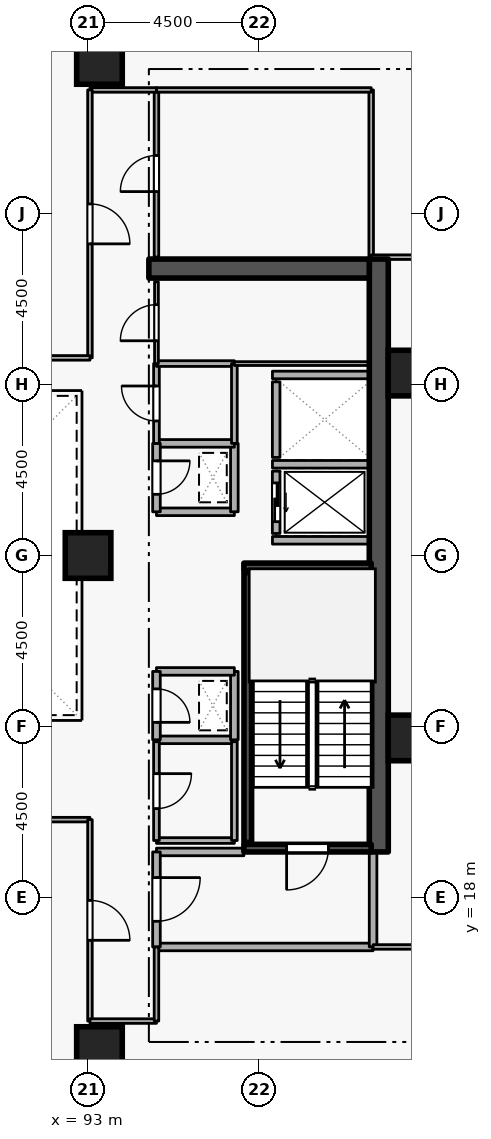
"""IFC4 building model, lengths in metres.
Left out: names, types, materials, properties, quantities, classifications, styles, units other than length and angle.
Written with IfcOpenShell. Run it as: python <this file> out.ifc"""

import sys

from ifc_helpers import new_model, si_unit, direction, frame, frame_2d, origin, origin_2d, place, context, subcontext, project, spatial, rectangle, extrude, element, fill, save


model = new_model("IFC4")
c1 = context("Model", 3, precision=1e-05, world=origin(), true_north=direction((0.0, 1.0)))
c2 = subcontext(c1, "Body", "Model", "MODEL_VIEW")
j1 = project(units=[si_unit("LENGTHUNIT", "METRE"), si_unit("PLANEANGLEUNIT", "RADIAN")], contexts=[c1])
p1 = place(None, origin())
s1 = spatial("IfcSite", under=j1, at=p1, CompositionType="ELEMENT")
p2 = place(p1, origin())
s2 = spatial("IfcBuilding", under=s1, at=p2, CompositionType="ELEMENT")
p3 = place(p2, frame((0.0, 0.0, 123.3)))
s3 = spatial("IfcBuildingStorey", under=s2, at=p3, CompositionType="ELEMENT", Elevation=123.3)
p4 = place(p3, frame((100.65, 19.2, 0.0), z_axis=(0.0, 0.0, 1.0), x_axis=(0.0, 1.0, 0.0)))
e1 = element("IfcWall", 1, at=p4, inside=s3, PredefinedType="SHEAR", context=c2, shape_type="SweptSolid", body=[
    extrude(rectangle(XDim=15.6, YDim=0.5, at=frame_2d((7.8, 0.0))), origin(), (0.0, 0.0, 1.0), 3.6),
])
p5 = place(p3, frame((94.6, 34.55, 0.0), z_axis=(0.0, 0.0, 1.0), x_axis=(1.0, 0.0, 0.0)))
e2 = element("IfcWall", 2, at=p5, inside=s3, PredefinedType="SHEAR", context=c2, shape_type="SweptSolid", body=[
    extrude(rectangle(XDim=5.8, YDim=0.5, at=frame_2d((2.9, 0.0))), origin(), (0.0, 0.0, 1.0), 3.6),
])
for number, where, z_axis, x_axis in (
    (3, (93.3, 14.0, 0.0), (0.0, 0.0, 1.0), (1.0, 0.0, 0.0)),
    (4, (93.3, 40.0, 0.0), (0.0, 0.0, 1.0), (1.0, 0.0, 0.0)),
    (5, (101.5, 22.2, 0.0), (0.0, 0.0, 1.0), (1.0, 0.0, 0.0)),
    (6, (101.5, 31.8, 0.0), (0.0, 0.0, 1.0), (1.0, 0.0, 0.0)),
    (7, (93.0, 27.0, 0.0), (0.0, 0.0, 1.0), (1.0, 0.0, 0.0)),
):
    element("IfcColumn", number, at=place(p3, frame(where, z_axis=z_axis, x_axis=x_axis)), inside=s3, PredefinedType="COLUMN", context=c2, shape_type="SweptSolid", body=[
        extrude(rectangle(XDim=1.2, YDim=1.2, at=origin_2d()), origin(), (0.0, 0.0, 1.0), 3.6),
    ])
p6 = place(p3, frame((97.95, 29.22, 0.0), z_axis=(0.0, 0.0, 1.0), x_axis=(0.0, -1.0, 0.0)))
e8 = element("IfcWall", 8, at=p6, inside=s3, PredefinedType="STANDARD", context=c2, shape_type="SweptSolid", body=[
    extrude(rectangle(XDim=1.64, YDim=0.2, at=frame_2d((0.82, 0.0))), origin(), (0.0, 0.0, 1.0), 3.34),
])
p7 = place(p6, frame((0.31, 0.0, 0.0)))
e9 = element("IfcOpeningElement", 9, at=p7, cuts=e8, PredefinedType="OPENING", context=c2, shape_type="SweptSolid", body=[
    extrude(rectangle(XDim=1.02, YDim=2.06, at=frame_2d((0.51, 1.03))), frame((0.0, 0.11, 0.0), z_axis=(0.0, -1.0, 0.0), x_axis=(1.0, 0.0, 0.0)), (0.0, 0.0, 1.0), 0.22),
])
p8 = place(p3, frame((97.95, 31.57, 0.0), z_axis=(0.0, 0.0, 1.0), x_axis=(0.0, -1.0, 0.0)))
e10 = element("IfcWall", 10, at=p8, inside=s3, PredefinedType="STANDARD", context=c2, shape_type="SweptSolid", body=[
    extrude(rectangle(XDim=1.99, YDim=0.2, at=frame_2d((0.995, 0.0))), origin(), (0.0, 0.0, 1.0), 3.34),
])
for number, where, z_axis, x_axis in (
    (11, (97.852, 29.4, 0.0), (0.0, 0.0, 1.0), (1.0, 0.0, 0.0)),
    (12, (97.852, 27.4, 0.0), (0.0, 0.0, 1.0), (1.0, 0.0, 0.0)),
    (13, (97.852, 31.75, 0.0), (0.0, 0.0, 1.0), (1.0, 0.0, 0.0)),
):
    element("IfcWall", number, at=place(p3, frame(where, z_axis=z_axis, x_axis=x_axis)), inside=s3, PredefinedType="STANDARD", context=c2, shape_type="SweptSolid", body=[
        extrude(rectangle(XDim=2.536, YDim=0.2, at=frame_2d((1.268, 0.0))), origin(), (0.0, 0.0, 1.0), 3.34),
    ])
p9 = place(p3, frame((100.45, 19.3, 0.0), z_axis=(0.0, 0.0, 1.0), x_axis=(-1.0, 0.0, 0.0)))
e14 = element("IfcWall", 14, at=p9, inside=s3, PredefinedType="SHEAR", context=c2, shape_type="SweptSolid", body=[
    extrude(rectangle(XDim=3.35, YDim=0.2, at=frame_2d((1.675, 0.0))), origin(), (0.0, 0.0, 1.0), 3.6),
])
p10 = place(p9, frame((1.125, 0.0, 0.0)))
e15 = element("IfcOpeningElement", 15, at=p10, cuts=e14, PredefinedType="OPENING", context=c2, shape_type="SweptSolid", body=[
    extrude(rectangle(XDim=1.1, YDim=2.1, at=frame_2d((0.55, 1.05))), frame((0.0, 0.11, 0.0), z_axis=(0.0, -1.0, 0.0), x_axis=(1.0, 0.0, 0.0)), (0.0, 0.0, 1.0), 0.22),
])
p11 = place(p3, frame((97.1, 26.7, 0.0), z_axis=(0.0, 0.0, 1.0), x_axis=(1.0, 0.0, 0.0)))
e16 = element("IfcWall", 16, at=p11, inside=s3, PredefinedType="SHEAR", context=c2, shape_type="SweptSolid", body=[
    extrude(rectangle(XDim=3.35, YDim=0.2, at=frame_2d((1.675, 0.0))), origin(), (0.0, 0.0, 1.0), 3.6),
])
p12 = place(p3, frame((97.203, 26.55, 0.0), z_axis=(0.0, 0.0, 1.0), x_axis=(0.0, -1.0, 0.0)))
e17 = element("IfcWall", 17, at=p12, inside=s3, PredefinedType="SHEAR", context=c2, shape_type="SweptSolid", body=[
    extrude(rectangle(XDim=7.1, YDim=0.2, at=frame_2d((3.55, 0.0))), origin(), (0.0, 0.0, 1.0), 3.6),
])
p13 = place(p3, frame((94.8, 16.7, 0.0), z_axis=(0.0, 0.0, 1.0), x_axis=(1.0, 0.0, 0.0)))
e18 = element("IfcWall", 18, at=p13, inside=s3, PredefinedType="STANDARD", context=c2, shape_type="SweptSolid", body=[
    extrude(rectangle(XDim=5.7, YDim=0.2, at=frame_2d((2.85, 0.0))), origin(), (0.0, 0.0, 1.0), 3.34),
])
p14 = place(p3, frame((100.5, 16.7, 0.0), z_axis=(0.0, 0.0, 1.0), x_axis=(0.0, 1.0, 0.0)))
e19 = element("IfcWall", 19, at=p14, inside=s3, PredefinedType="STANDARD", context=c2, shape_type="SweptSolid", body=[
    extrude(rectangle(XDim=2.5, YDim=0.2, at=frame_2d((1.25, 0.0))), origin(), (0.0, 0.0, 1.0), 3.34),
])
p15 = place(p3, frame((97.1, 19.2, 0.0), z_axis=(0.0, 0.0, 1.0), x_axis=(-1.0, 0.0, 0.0)))
e20 = element("IfcWall", 20, at=p15, inside=s3, PredefinedType="STANDARD", context=c2, shape_type="SweptSolid", body=[
    extrude(rectangle(XDim=2.3, YDim=0.2, at=frame_2d((1.15, 0.0))), origin(), (0.0, 0.0, 1.0), 2.545),
])
p16 = place(p3, frame((94.8, 19.2, 0.0), z_axis=(0.0, 0.0, 1.0), x_axis=(0.0, -1.0, 0.0)))
e21 = element("IfcWall", 21, at=p16, inside=s3, PredefinedType="STANDARD", context=c2, shape_type="SweptSolid", body=[
    extrude(rectangle(XDim=2.5, YDim=0.2, at=frame_2d((1.25, 0.0))), origin(), (0.0, 0.0, 1.0), 3.34),
])
p17 = place(p16, frame((0.675, 0.0, 0.0)))
e22 = element("IfcOpeningElement", 22, at=p17, cuts=e21, PredefinedType="OPENING", context=c2, shape_type="SweptSolid", body=[
    extrude(rectangle(XDim=1.15, YDim=2.1, at=frame_2d((0.575, 1.05))), frame((0.0, 0.11, 0.0), z_axis=(0.0, -1.0, 0.0), x_axis=(1.0, 0.0, 0.0)), (0.0, 0.0, 1.0), 0.22),
])
p18 = place(p3, frame((94.8, 28.15, 0.0), z_axis=(0.0, 0.0, 1.0), x_axis=(1.0, 0.0, 0.0)))
e23 = element("IfcWall", 23, at=p18, inside=s3, PredefinedType="STANDARD", context=c2, shape_type="SweptSolid", body=[
    extrude(rectangle(XDim=2.05, YDim=0.2, at=frame_2d((1.025, 0.0))), origin(), (0.0, 0.0, 1.0), 3.34),
])
p19 = place(p3, frame((96.85, 28.15, 0.0), z_axis=(0.0, 0.0, 1.0), x_axis=(0.0, 1.0, 0.0)))
e24 = element("IfcWall", 24, at=p19, inside=s3, PredefinedType="STANDARD", context=c2, shape_type="SweptSolid", body=[
    extrude(rectangle(XDim=1.8, YDim=0.2, at=frame_2d((0.9, 0.0))), origin(), (0.0, 0.0, 1.0), 3.34),
])
p20 = place(p3, frame((96.85, 29.95, 0.0), z_axis=(0.0, 0.0, 1.0), x_axis=(-1.0, 0.0, 0.0)))
e25 = element("IfcWall", 25, at=p20, inside=s3, PredefinedType="STANDARD", context=c2, shape_type="SweptSolid", body=[
    extrude(rectangle(XDim=2.05, YDim=0.2, at=frame_2d((1.025, 0.0))), origin(), (0.0, 0.0, 1.0), 3.34),
])
p21 = place(p3, frame((94.8, 29.95, 0.0), z_axis=(0.0, 0.0, 1.0), x_axis=(0.0, -1.0, 0.0)))
e26 = element("IfcWall", 26, at=p21, inside=s3, PredefinedType="STANDARD", context=c2, shape_type="SweptSolid", body=[
    extrude(rectangle(XDim=1.8, YDim=0.2, at=frame_2d((0.9, 0.0))), origin(), (0.0, 0.0, 1.0), 3.34),
])
p22 = place(p21, frame((0.46, 0.0, 0.0)))
e27 = element("IfcOpeningElement", 27, at=p22, cuts=e26, PredefinedType="OPENING", context=c2, shape_type="SweptSolid", body=[
    extrude(rectangle(XDim=0.88, YDim=2.04, at=frame_2d((0.44, 1.02))), frame((0.0, 0.11, 0.0), z_axis=(0.0, -1.0, 0.0), x_axis=(1.0, 0.0, 0.0)), (0.0, 0.0, 1.0), 0.22),
])
p23 = place(p3, frame((94.8, 22.15, 0.0), z_axis=(0.0, 0.0, 1.0), x_axis=(1.0, 0.0, 0.0)))
e28 = element("IfcWall", 28, at=p23, inside=s3, PredefinedType="STANDARD", context=c2, shape_type="SweptSolid", body=[
    extrude(rectangle(XDim=2.05, YDim=0.2, at=frame_2d((1.025, 0.0))), origin(), (0.0, 0.0, 1.0), 3.34),
])
p24 = place(p3, frame((96.85, 22.15, 0.0), z_axis=(0.0, 0.0, 1.0), x_axis=(0.0, 1.0, 0.0)))
e29 = element("IfcWall", 29, at=p24, inside=s3, PredefinedType="STANDARD", context=c2, shape_type="SweptSolid", body=[
    extrude(rectangle(XDim=1.8, YDim=0.2, at=frame_2d((0.9, 0.0))), origin(), (0.0, 0.0, 1.0), 3.34),
])
p25 = place(p3, frame((96.85, 23.95, 0.0), z_axis=(0.0, 0.0, 1.0), x_axis=(-1.0, 0.0, 0.0)))
e30 = element("IfcWall", 30, at=p25, inside=s3, PredefinedType="STANDARD", context=c2, shape_type="SweptSolid", body=[
    extrude(rectangle(XDim=2.05, YDim=0.2, at=frame_2d((1.025, 0.0))), origin(), (0.0, 0.0, 1.0), 3.34),
])
p26 = place(p3, frame((94.8, 23.95, 0.0), z_axis=(0.0, 0.0, 1.0), x_axis=(0.0, -1.0, 0.0)))
e31 = element("IfcWall", 31, at=p26, inside=s3, PredefinedType="STANDARD", context=c2, shape_type="SweptSolid", body=[
    extrude(rectangle(XDim=1.8, YDim=0.2, at=frame_2d((0.9, 0.0))), origin(), (0.0, 0.0, 1.0), 3.34),
])
p27 = place(p26, frame((0.46, 0.0, 0.0)))
e32 = element("IfcOpeningElement", 32, at=p27, cuts=e31, PredefinedType="OPENING", context=c2, shape_type="SweptSolid", body=[
    extrude(rectangle(XDim=0.88, YDim=2.04, at=frame_2d((0.44, 1.02))), frame((0.0, 0.11, 0.0), z_axis=(0.0, -1.0, 0.0), x_axis=(1.0, 0.0, 0.0)), (0.0, 0.0, 1.0), 0.22),
])
p28 = place(p3, frame((94.8, 19.5, 0.0), z_axis=(0.0, 0.0, 1.0), x_axis=(1.0, 0.0, 0.0)))
e33 = element("IfcWall", 33, at=p28, inside=s3, PredefinedType="PARTITIONING", context=c2, shape_type="SweptSolid", body=[
    extrude(rectangle(XDim=2.05, YDim=0.15, at=frame_2d((1.025, 0.0))), origin(), (0.0, 0.0, 1.0), 2.545),
])
p29 = place(p3, frame((96.85, 19.5, 0.0), z_axis=(0.0, 0.0, 1.0), x_axis=(0.0, 1.0, 0.0)))
e34 = element("IfcWall", 34, at=p29, inside=s3, PredefinedType="PARTITIONING", context=c2, shape_type="SweptSolid", body=[
    extrude(rectangle(XDim=2.6, YDim=0.15, at=frame_2d((1.3, 0.0))), origin(), (0.0, 0.0, 1.0), 3.34),
])
p30 = place(p3, frame((94.8, 22.1, 0.0), z_axis=(0.0, 0.0, 1.0), x_axis=(0.0, -1.0, 0.0)))
e35 = element("IfcWall", 35, at=p30, inside=s3, PredefinedType="PARTITIONING", context=c2, shape_type="SweptSolid", body=[
    extrude(rectangle(XDim=2.6, YDim=0.15, at=frame_2d((1.3, 0.0))), origin(), (0.0, 0.0, 1.0), 3.34),
])
p31 = place(p30, frame((0.84, 0.0, 0.0)))
e36 = element("IfcOpeningElement", 36, at=p31, cuts=e35, PredefinedType="OPENING", context=c2, shape_type="SweptSolid", body=[
    extrude(rectangle(XDim=0.92, YDim=2.08, at=frame_2d((0.46, 1.04))), frame((0.0, 0.085, 0.0), z_axis=(0.0, -1.0, 0.0), x_axis=(1.0, 0.0, 0.0)), (0.0, 0.0, 1.0), 0.17),
])
p32 = place(p3, frame((94.8, 29.95, 0.0), z_axis=(0.0, 0.0, 1.0), x_axis=(0.0, 1.0, 0.0)))
e37 = element("IfcWall", 37, at=p32, inside=s3, PredefinedType="PARTITIONING", context=c2, shape_type="SweptSolid", body=[
    extrude(rectangle(XDim=2.1, YDim=0.15, at=frame_2d((1.05, 0.0))), origin(), (0.0, 0.0, 1.0), 3.34),
])
p33 = place(p32, frame((0.59, 0.0, 0.0)))
e38 = element("IfcOpeningElement", 38, at=p33, cuts=e37, PredefinedType="OPENING", context=c2, shape_type="SweptSolid", body=[
    extrude(rectangle(XDim=0.92, YDim=2.08, at=frame_2d((0.46, 1.04))), frame((0.0, 0.085, 0.0), z_axis=(0.0, -1.0, 0.0), x_axis=(1.0, 0.0, 0.0)), (0.0, 0.0, 1.0), 0.17),
])
p34 = place(p3, frame((94.8, 32.05, 0.0), z_axis=(0.0, 0.0, 1.0), x_axis=(1.0, 0.0, 0.0)))
e39 = element("IfcWall", 39, at=p34, inside=s3, PredefinedType="PARTITIONING", context=c2, shape_type="SweptSolid", body=[
    extrude(rectangle(XDim=2.05, YDim=0.15, at=frame_2d((1.025, 0.0))), origin(), (0.0, 0.0, 1.0), 3.34),
])
p35 = place(p3, frame((96.85, 32.05, 0.0), z_axis=(0.0, 0.0, 1.0), x_axis=(0.0, -1.0, 0.0)))
e40 = element("IfcWall", 40, at=p35, inside=s3, PredefinedType="PARTITIONING", context=c2, shape_type="SweptSolid", body=[
    extrude(rectangle(XDim=2.1, YDim=0.15, at=frame_2d((1.05, 0.0))), origin(), (0.0, 0.0, 1.0), 3.34),
])
p36 = place(p3, frame((94.8, 32.05, 0.0), z_axis=(0.0, 0.0, 1.0), x_axis=(0.0, 1.0, 0.0)))
e41 = element("IfcWall", 41, at=p36, inside=s3, PredefinedType="PARTITIONING", context=c2, shape_type="SweptSolid", body=[
    extrude(rectangle(XDim=2.15, YDim=0.1, at=frame_2d((1.075, 0.0))), origin(), (0.0, 0.0, 1.0), 3.34),
])
p37 = place(p36, frame((0.6, 0.0, 0.0)))
e42 = element("IfcOpeningElement", 42, at=p37, cuts=e41, PredefinedType="OPENING", context=c2, shape_type="SweptSolid", body=[
    extrude(rectangle(XDim=0.95, YDim=2.1, at=frame_2d((0.475, 1.05))), frame((0.0, 0.06, 0.0), z_axis=(0.0, -1.0, 0.0), x_axis=(1.0, 0.0, 0.0)), (0.0, 0.0, 1.0), 0.12),
])
p38 = place(p3, frame((100.4, 32.05, 0.0), z_axis=(0.0, 0.0, 1.0), x_axis=(-1.0, 0.0, 0.0)))
e43 = element("IfcWall", 43, at=p38, inside=s3, PredefinedType="PARTITIONING", context=c2, shape_type="SweptSolid", body=[
    extrude(rectangle(XDim=3.55, YDim=0.1, at=frame_2d((1.775, 0.0))), origin(), (0.0, 0.0, 1.0), 3.34),
])
p39 = place(p3, frame((100.45, 39.25, 0.0), z_axis=(0.0, 0.0, 1.0), x_axis=(0.0, -1.0, 0.0)))
e44 = element("IfcWall", 44, at=p39, inside=s3, PredefinedType="PARTITIONING", context=c2, shape_type="SweptSolid", body=[
    extrude(rectangle(XDim=4.4, YDim=0.12, at=frame_2d((2.2, 0.0))), origin(), (0.0, 0.0, 1.0), 3.34),
])
p40 = place(p3, frame((94.8, 34.85, 0.0), z_axis=(0.0, 0.0, 1.0), x_axis=(0.0, 1.0, 0.0)))
e45 = element("IfcWall", 45, at=p40, inside=s3, PredefinedType="PARTITIONING", context=c2, shape_type="SweptSolid", body=[
    extrude(rectangle(XDim=4.4, YDim=0.12, at=frame_2d((2.2, 0.0))), origin(), (0.0, 0.0, 1.0), 3.34),
])
p41 = place(p40, frame((1.725, 0.0, 0.0)))
e46 = element("IfcOpeningElement", 46, at=p41, cuts=e45, PredefinedType="OPENING", context=c2, shape_type="SweptSolid", body=[
    extrude(rectangle(XDim=0.95, YDim=2.1, at=frame_2d((0.475, 1.05))), frame((0.0, 0.07, 0.0), z_axis=(0.0, -1.0, 0.0), x_axis=(1.0, 0.0, 0.0)), (0.0, 0.0, 1.0), 0.14),
])
p42 = place(p3, frame((94.8, 39.25, 0.0), z_axis=(0.0, 0.0, 1.0), x_axis=(1.0, 0.0, 0.0)))
e47 = element("IfcWall", 47, at=p42, inside=s3, PredefinedType="PARTITIONING", context=c2, shape_type="SweptSolid", body=[
    extrude(rectangle(XDim=5.65, YDim=0.12, at=frame_2d((2.825, 0.0))), origin(), (0.0, 0.0, 1.0), 3.34),
])
p43 = place(p3, frame((88.5, 20.05, 0.0), z_axis=(0.0, 0.0, 1.0), x_axis=(1.0, 0.0, 0.0)))
e48 = element("IfcWall", 48, at=p43, inside=s3, PredefinedType="PARTITIONING", context=c2, shape_type="SweptSolid", body=[
    extrude(rectangle(XDim=4.55, YDim=0.12, at=frame_2d((2.275, 0.0))), origin(), (0.0, 0.0, 1.0), 3.34),
])
p44 = place(p3, frame((93.05, 20.05, 0.0), z_axis=(0.0, 0.0, 1.0), x_axis=(0.0, -1.0, 0.0)))
e49 = element("IfcWall", 49, at=p44, inside=s3, PredefinedType="PARTITIONING", context=c2, shape_type="SweptSolid", body=[
    extrude(rectangle(XDim=5.3, YDim=0.12, at=frame_2d((2.65, 0.0))), origin(), (0.0, 0.0, 1.0), 3.34),
])
p45 = place(p44, frame((2.125, 0.0, 0.0)))
e50 = element("IfcOpeningElement", 50, at=p45, cuts=e49, PredefinedType="OPENING", context=c2, shape_type="SweptSolid", body=[
    extrude(rectangle(XDim=1.05, YDim=2.1, at=frame_2d((0.525, 1.05))), frame((0.0, 0.07, 0.0), z_axis=(0.0, -1.0, 0.0), x_axis=(1.0, 0.0, 0.0)), (0.0, 0.0, 1.0), 0.14),
])
p46 = place(p3, frame((93.05, 14.75, 0.0), z_axis=(0.0, 0.0, 1.0), x_axis=(1.0, 0.0, 0.0)))
e51 = element("IfcWall", 51, at=p46, inside=s3, PredefinedType="PARTITIONING", context=c2, shape_type="SweptSolid", body=[
    extrude(rectangle(XDim=1.75, YDim=0.12, at=frame_2d((0.875, 0.0))), origin(), (0.0, 0.0, 1.0), 3.34),
])
p47 = place(p3, frame((94.8, 14.75, 0.0), z_axis=(0.0, 0.0, 1.0), x_axis=(0.0, 1.0, 0.0)))
e52 = element("IfcWall", 52, at=p47, inside=s3, PredefinedType="PARTITIONING", context=c2, shape_type="SweptSolid", body=[
    extrude(rectangle(XDim=1.95, YDim=0.12, at=frame_2d((0.975, 0.0))), origin(), (0.0, 0.0, 1.0), 3.34),
])
p48 = place(p3, frame((100.5, 16.7, 0.0), z_axis=(0.0, 0.0, 1.0), x_axis=(1.0, 0.0, 0.0)))
e53 = element("IfcWall", 53, at=p48, inside=s3, PredefinedType="PARTITIONING", context=c2, shape_type="SweptSolid", body=[
    extrude(rectangle(XDim=11.72, YDim=0.12, at=frame_2d((5.86, 0.0))), origin(), (0.0, 0.0, 1.0), 3.34),
])
p49 = place(p3, frame((94.8, 39.25, 0.0), z_axis=(0.0, 0.0, 1.0), x_axis=(-1.0, 0.0, 0.0)))
e54 = element("IfcWall", 54, at=p49, inside=s3, PredefinedType="PARTITIONING", context=c2, shape_type="SweptSolid", body=[
    extrude(rectangle(XDim=1.75, YDim=0.12, at=frame_2d((0.875, 0.0))), origin(), (0.0, 0.0, 1.0), 3.34),
])
p50 = place(p3, frame((93.05, 39.25, 0.0), z_axis=(0.0, 0.0, 1.0), x_axis=(0.0, -1.0, 0.0)))
e55 = element("IfcWall", 55, at=p50, inside=s3, PredefinedType="PARTITIONING", context=c2, shape_type="SweptSolid", body=[
    extrude(rectangle(XDim=7.05, YDim=0.12, at=frame_2d((3.525, 0.0))), origin(), (0.0, 0.0, 1.0), 3.34),
])
p51 = place(p50, frame((3.0, 0.0, 0.0)))
e56 = element("IfcOpeningElement", 56, at=p51, cuts=e55, PredefinedType="OPENING", context=c2, shape_type="SweptSolid", body=[
    extrude(rectangle(XDim=1.05, YDim=2.1, at=frame_2d((0.525, 1.05))), frame((0.0, 0.07, 0.0), z_axis=(0.0, -1.0, 0.0), x_axis=(1.0, 0.0, 0.0)), (0.0, 0.0, 1.0), 0.14),
])
p52 = place(p3, frame((93.05, 32.2, 0.0), z_axis=(0.0, 0.0, 1.0), x_axis=(-1.0, 0.0, 0.0)))
e57 = element("IfcWall", 57, at=p52, inside=s3, PredefinedType="PARTITIONING", context=c2, shape_type="SweptSolid", body=[
    extrude(rectangle(XDim=4.55, YDim=0.12, at=frame_2d((2.275, 0.0))), origin(), (0.0, 0.0, 1.0), 3.34),
])
p53 = place(p3, frame((112.22, 34.85, 0.0), z_axis=(0.0, 0.0, 1.0), x_axis=(-1.0, 0.0, 0.0)))
e58 = element("IfcWall", 58, at=p53, inside=s3, PredefinedType="PARTITIONING", context=c2, shape_type="SweptSolid", body=[
    extrude(rectangle(XDim=11.77, YDim=0.12, at=frame_2d((5.885, 0.0))), origin(), (0.0, 0.0, 1.0), 2.545),
])
p54 = place(p7, origin())
e59 = element("IfcDoor", 59, at=p54, inside=s3, OperationType="SLIDING_TO_LEFT", PredefinedType="DOOR", context=c2, shape_type="SweptSolid", body=[
    extrude(rectangle(XDim=1.02, YDim=2.06, at=frame_2d((0.51, 1.03))), frame((0.0, 0.025, 0.0), z_axis=(0.0, -1.0, 0.0), x_axis=(1.0, 0.0, 0.0)), (0.0, 0.0, 1.0), 0.05),
])
fill(e9, e59)
p55 = place(p10, origin())
e60 = element("IfcDoor", 60, at=p55, inside=s3, OperationType="SINGLE_SWING_RIGHT", PredefinedType="DOOR", context=c2, shape_type="SweptSolid", body=[
    extrude(rectangle(XDim=1.1, YDim=2.1, at=frame_2d((0.55, 1.05))), frame((0.0, 0.025, 0.0), z_axis=(0.0, -1.0, 0.0), x_axis=(1.0, 0.0, 0.0)), (0.0, 0.0, 1.0), 0.05),
])
fill(e15, e60)
p56 = place(p17, origin())
e61 = element("IfcDoor", 61, at=p56, inside=s3, OperationType="SINGLE_SWING_LEFT", PredefinedType="DOOR", context=c2, shape_type="SweptSolid", body=[
    extrude(rectangle(XDim=1.15, YDim=2.1, at=frame_2d((0.575, 1.05))), frame((0.0, 0.025, 0.0), z_axis=(0.0, -1.0, 0.0), x_axis=(1.0, 0.0, 0.0)), (0.0, 0.0, 1.0), 0.05),
])
fill(e22, e61)
p57 = place(p22, origin())
e62 = element("IfcDoor", 62, at=p57, inside=s3, OperationType="SINGLE_SWING_LEFT", PredefinedType="DOOR", context=c2, shape_type="SweptSolid", body=[
    extrude(rectangle(XDim=0.88, YDim=2.04, at=frame_2d((0.44, 1.02))), frame((0.0, 0.025, 0.0), z_axis=(0.0, -1.0, 0.0), x_axis=(1.0, 0.0, 0.0)), (0.0, 0.0, 1.0), 0.05),
])
fill(e27, e62)
p58 = place(p27, origin())
e63 = element("IfcDoor", 63, at=p58, inside=s3, OperationType="SINGLE_SWING_RIGHT", PredefinedType="DOOR", context=c2, shape_type="SweptSolid", body=[
    extrude(rectangle(XDim=0.88, YDim=2.04, at=frame_2d((0.44, 1.02))), frame((0.0, 0.025, 0.0), z_axis=(0.0, -1.0, 0.0), x_axis=(1.0, 0.0, 0.0)), (0.0, 0.0, 1.0), 0.05),
])
fill(e32, e63)
p59 = place(p31, origin())
e64 = element("IfcDoor", 64, at=p59, inside=s3, OperationType="SINGLE_SWING_LEFT", PredefinedType="DOOR", context=c2, shape_type="SweptSolid", body=[
    extrude(rectangle(XDim=0.92, YDim=2.08, at=frame_2d((0.46, 1.04))), frame((0.0, 0.025, 0.0), z_axis=(0.0, -1.0, 0.0), x_axis=(1.0, 0.0, 0.0)), (0.0, 0.0, 1.0), 0.05),
])
fill(e36, e64)
p60 = place(p33, origin())
e65 = element("IfcDoor", 65, at=p60, inside=s3, OperationType="SINGLE_SWING_RIGHT", PredefinedType="DOOR", context=c2, shape_type="SweptSolid", body=[
    extrude(rectangle(XDim=0.92, YDim=2.08, at=frame_2d((0.46, 1.04))), frame((0.0, 0.025, 0.0), z_axis=(0.0, -1.0, 0.0), x_axis=(1.0, 0.0, 0.0)), (0.0, 0.0, 1.0), 0.05),
])
fill(e38, e65)
p61 = place(p37, origin())
e66 = element("IfcDoor", 66, at=p61, inside=s3, OperationType="SINGLE_SWING_LEFT", PredefinedType="DOOR", context=c2, shape_type="SweptSolid", body=[
    extrude(rectangle(XDim=0.95, YDim=2.1, at=frame_2d((0.475, 1.05))), frame((0.0, 0.025, 0.0), z_axis=(0.0, -1.0, 0.0), x_axis=(1.0, 0.0, 0.0)), (0.0, 0.0, 1.0), 0.05),
])
fill(e42, e66)
p62 = place(p41, origin())
e67 = element("IfcDoor", 67, at=p62, inside=s3, OperationType="SINGLE_SWING_LEFT", PredefinedType="DOOR", context=c2, shape_type="SweptSolid", body=[
    extrude(rectangle(XDim=0.95, YDim=2.1, at=frame_2d((0.475, 1.05))), frame((0.0, 0.025, 0.0), z_axis=(0.0, -1.0, 0.0), x_axis=(1.0, 0.0, 0.0)), (0.0, 0.0, 1.0), 0.05),
])
fill(e46, e67)
p63 = place(p45, origin())
e68 = element("IfcDoor", 68, at=p63, inside=s3, OperationType="SINGLE_SWING_RIGHT", PredefinedType="DOOR", context=c2, shape_type="SweptSolid", body=[
    extrude(rectangle(XDim=1.05, YDim=2.1, at=frame_2d((0.525, 1.05))), frame((0.0, 0.025, 0.0), z_axis=(0.0, -1.0, 0.0), x_axis=(1.0, 0.0, 0.0)), (0.0, 0.0, 1.0), 0.05),
])
fill(e50, e68)
p64 = place(p51, origin())
e69 = element("IfcDoor", 69, at=p64, inside=s3, OperationType="SINGLE_SWING_RIGHT", PredefinedType="DOOR", context=c2, shape_type="SweptSolid", body=[
    extrude(rectangle(XDim=1.05, YDim=2.1, at=frame_2d((0.525, 1.05))), frame((0.0, 0.025, 0.0), z_axis=(0.0, -1.0, 0.0), x_axis=(1.0, 0.0, 0.0)), (0.0, 0.0, 1.0), 0.05),
])
fill(e56, e69)
save(model, sys.argv[1])
